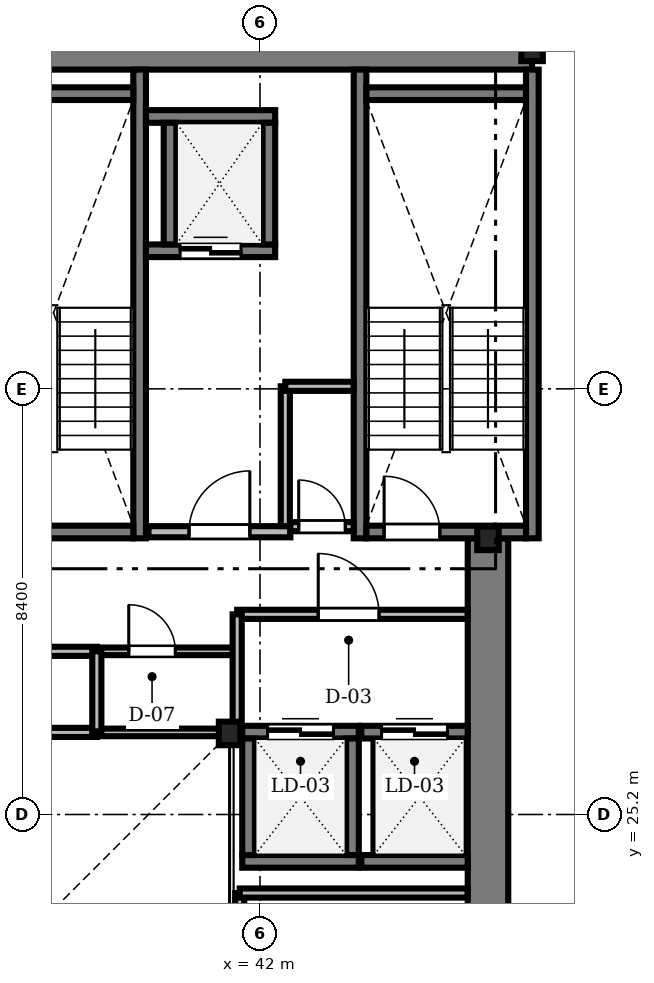
"""IFC4 building model, lengths in metres.
Left out: names, types, materials, properties, quantities, classifications, styles, units other than length and angle.
Written with IfcOpenShell. Run it as: python <this file> out.ifc"""

import sys

from ifc_helpers import new_model, si_unit, direction, frame, frame_2d, origin, origin_2d, place, context, subcontext, project, spatial, rectangle, i_section, extrude, source, transform, mapped, element, fill, save


model = new_model("IFC4")
c1 = context("Model", 3, precision=1e-05, world=origin(), true_north=direction((0.0, 1.0)))
c2 = subcontext(c1, "Body", "Model", "MODEL_VIEW")
j1 = project(units=[si_unit("LENGTHUNIT", "METRE"), si_unit("PLANEANGLEUNIT", "RADIAN")], contexts=[c1])
p1 = place(None, origin())
s1 = spatial("IfcSite", under=j1, at=p1, CompositionType="ELEMENT")
p2 = place(p1, origin())
s2 = spatial("IfcBuilding", under=s1, at=p2, CompositionType="ELEMENT")
p3 = place(p2, frame((0.0, 0.0, 107.5)))
s3 = spatial("IfcBuildingStorey", under=s2, at=p3, CompositionType="ELEMENT", Elevation=107.5)
m1 = source(origin(), c2, "Body", "SweptSolid", [
    extrude(rectangle(XDim=17.52, YDim=0.8, at=frame_2d((8.76, 0.0))), origin(), (0.0, 0.0, 1.0), 3.56),
])
p4 = place(p3, frame((29.85, 40.3, 0.0), z_axis=(0.0, 0.0, 1.0), x_axis=(1.0, 0.0, 0.0)))
e1 = element("IfcWall", 1, at=p4, inside=s3, PredefinedType="SHEAR", context=c2, shape_type="MappedRepresentation", body=[
    mapped(m1, transform((0.0, 0.0, 0.0), scale=1.0)),
])
m2 = source(origin(), c2, "Body", "SweptSolid", [
    extrude(rectangle(XDim=13.15, YDim=0.8, at=frame_2d((6.575, 0.0))), origin(), (0.0, 0.0, 1.0), 3.56),
])
p5 = place(p3, frame((46.5, 17.5, 0.0), z_axis=(0.0, 0.0, 1.0), x_axis=(0.0, 1.0, 0.0)))
e2 = element("IfcWall", 2, at=p5, inside=s3, PredefinedType="SHEAR", context=c2, shape_type="MappedRepresentation", body=[
    mapped(m2, transform((0.0, 0.0, 0.0), scale=1.0)),
])
m3 = source(origin(), c2, "Body", "SweptSolid", [
    extrude(i_section(OverallWidth=0.424, OverallDepth=0.465, WebThickness=0.035, FlangeThickness=0.056, FilletRadius=0.015, at=origin_2d()), origin(), (0.0, 0.0, 1.0), 3.56),
])
for number, where, z_axis, x_axis in (
    (3, (41.4, 26.8, 0.0), (0.0, 0.0, 1.0), (1.0, 0.0, 0.0)),
    (4, (46.5, 30.65, 0.0), (0.0, 0.0, 1.0), (1.0, 0.0, 0.0)),
    (5, (47.37, 40.3, 0.0), (0.0, 0.0, 1.0), (1.0, 0.0, 0.0)),
):
    element("IfcColumn", number, at=place(p3, frame(where, z_axis=z_axis, x_axis=x_axis)), inside=s3, PredefinedType="COLUMN", context=c2, shape_type="MappedRepresentation", body=[
        mapped(m3, transform((0.0, 0.0, 0.0), scale=1.0)),
    ])
m4 = source(origin(), c2, "Body", "SweptSolid", [
    extrude(rectangle(XDim=9.25, YDim=0.25, at=frame_2d((4.625, 0.0))), origin(), (0.0, 0.0, 1.0), 3.6),
])
p6 = place(p3, frame((39.625, 30.65, 0.0), z_axis=(0.0, 0.0, 1.0), x_axis=(0.0, 1.0, 0.0)))
e6 = element("IfcWall", 6, at=p6, inside=s3, PredefinedType="SOLIDWALL", context=c2, shape_type="MappedRepresentation", body=[
    mapped(m4, transform((0.0, 0.0, 0.0), scale=1.0)),
])
m5 = source(origin(), c2, "Body", "SweptSolid", [
    extrude(rectangle(XDim=3.15, YDim=0.25, at=frame_2d((1.575, 0.0))), origin(), (0.0, 0.0, 1.0), 3.6),
])
p7 = place(p3, frame((36.35, 39.425, 0.0), z_axis=(0.0, 0.0, 1.0), x_axis=(1.0, 0.0, 0.0)))
e7 = element("IfcWall", 7, at=p7, inside=s3, PredefinedType="SOLIDWALL", context=c2, shape_type="MappedRepresentation", body=[
    mapped(m5, transform((0.0, 0.0, 0.0), scale=1.0)),
])
p8 = place(p3, frame((36.35, 30.775, 0.0), z_axis=(0.0, 0.0, 1.0), x_axis=(1.0, 0.0, 0.0)))
e8 = element("IfcWall", 8, at=p8, inside=s3, PredefinedType="SOLIDWALL", context=c2, shape_type="MappedRepresentation", body=[
    mapped(m5, transform((0.0, 0.0, 0.0), scale=1.0)),
])
m6 = source(origin(), c2, "Body", "SweptSolid", [
    extrude(rectangle(XDim=1.1, YDim=2.2, at=frame_2d((0.55, 1.1))), frame((0.0, 0.135, 0.0), z_axis=(0.0, -1.0, 0.0), x_axis=(1.0, 0.0, 0.0)), (0.0, 0.0, 1.0), 0.27),
])
p9 = place(p8, frame((0.35, 0.0, 0.0)))
e9 = element("IfcOpeningElement", 9, at=p9, cuts=e8, PredefinedType="OPENING", context=c2, shape_type="MappedRepresentation", body=[
    mapped(m6, transform((0.0, 0.0, 0.0), scale=1.0)),
])
for number, where, z_axis, x_axis in (
    (10, (43.975, 30.65, 0.0), (0.0, 0.0, 1.0), (0.0, 1.0, 0.0)),
    (11, (47.375, 30.65, 0.0), (0.0, 0.0, 1.0), (0.0, 1.0, 0.0)),
):
    element("IfcWall", number, at=place(p3, frame(where, z_axis=z_axis, x_axis=x_axis)), inside=s3, PredefinedType="SOLIDWALL", context=c2, shape_type="MappedRepresentation", body=[
        mapped(m4, transform((0.0, 0.0, 0.0), scale=1.0)),
    ])
p10 = place(p3, frame((44.1, 39.425, 0.0), z_axis=(0.0, 0.0, 1.0), x_axis=(1.0, 0.0, 0.0)))
e12 = element("IfcWall", 12, at=p10, inside=s3, PredefinedType="SOLIDWALL", context=c2, shape_type="MappedRepresentation", body=[
    mapped(m5, transform((0.0, 0.0, 0.0), scale=1.0)),
])
p11 = place(p3, frame((44.1, 30.775, 0.0), z_axis=(0.0, 0.0, 1.0), x_axis=(1.0, 0.0, 0.0)))
e13 = element("IfcWall", 13, at=p11, inside=s3, PredefinedType="SOLIDWALL", context=c2, shape_type="MappedRepresentation", body=[
    mapped(m5, transform((0.0, 0.0, 0.0), scale=1.0)),
])
p12 = place(p11, frame((0.35, 0.0, 0.0)))
e14 = element("IfcOpeningElement", 14, at=p12, cuts=e13, PredefinedType="OPENING", context=c2, shape_type="MappedRepresentation", body=[
    mapped(m6, transform((0.0, 0.0, 0.0), scale=1.0)),
])
m7 = source(origin(), c2, "Body", "SweptSolid", [
    extrude(rectangle(XDim=2.8, YDim=0.22, at=frame_2d((1.4, 0.0))), origin(), (0.0, 0.0, 1.0), 3.56),
])
p13 = place(p3, frame((39.8, 30.78, 0.0), z_axis=(0.0, 0.0, 1.0), x_axis=(1.0, 0.0, 0.0)))
e15 = element("IfcWall", 15, at=p13, inside=s3, PredefinedType="SOLIDWALL", context=c2, shape_type="MappedRepresentation", body=[
    mapped(m7, transform((0.0, 0.0, 0.0), scale=1.0)),
])
m8 = source(origin(), c2, "Body", "SweptSolid", [
    extrude(rectangle(XDim=1.2, YDim=2.2, at=frame_2d((0.6, 1.1))), frame((0.0, 0.12, 0.0), z_axis=(0.0, -1.0, 0.0), x_axis=(1.0, 0.0, 0.0)), (0.0, 0.0, 1.0), 0.24),
])
p14 = place(p13, frame((0.8, 0.0, 0.0)))
e16 = element("IfcOpeningElement", 16, at=p14, cuts=e15, PredefinedType="OPENING", context=c2, shape_type="MappedRepresentation", body=[
    mapped(m8, transform((0.0, 0.0, 0.0), scale=1.0)),
])
m9 = source(origin(), c2, "Body", "SweptSolid", [
    extrude(rectangle(XDim=2.55, YDim=0.25, at=frame_2d((1.275, 0.0))), origin(), (0.0, 0.0, 1.0), 3.56),
])
p15 = place(p3, frame((39.75, 36.325, 0.0), z_axis=(0.0, 0.0, 1.0), x_axis=(1.0, 0.0, 0.0)))
e17 = element("IfcWall", 17, at=p15, inside=s3, PredefinedType="SOLIDWALL", context=c2, shape_type="MappedRepresentation", body=[
    mapped(m9, transform((0.0, 0.0, 0.0), scale=1.0)),
])
m10 = source(origin(), c2, "Body", "SweptSolid", [
    extrude(rectangle(XDim=1.2, YDim=2.25, at=frame_2d((0.6, 1.125))), frame((0.0, 0.135, 0.0), z_axis=(0.0, -1.0, 0.0), x_axis=(1.0, 0.0, 0.0)), (0.0, 0.0, 1.0), 0.27),
])
p16 = place(p15, frame((0.675, 0.0, 0.0)))
e18 = element("IfcOpeningElement", 18, at=p16, cuts=e17, PredefinedType="OPENING", context=c2, shape_type="MappedRepresentation", body=[
    mapped(m10, transform((0.0, 0.0, 0.0), scale=1.0)),
])
p17 = place(p3, frame((39.75, 38.975, 0.0), z_axis=(0.0, 0.0, 1.0), x_axis=(1.0, 0.0, 0.0)))
e19 = element("IfcWall", 19, at=p17, inside=s3, PredefinedType="SOLIDWALL", context=c2, shape_type="MappedRepresentation", body=[
    mapped(m9, transform((0.0, 0.0, 0.0), scale=1.0)),
])
m11 = source(origin(), c2, "Body", "SweptSolid", [
    extrude(rectangle(XDim=2.4, YDim=0.25, at=frame_2d((1.2, 0.0))), origin(), (0.0, 0.0, 1.0), 3.56),
])
for number, where, z_axis, x_axis in (
    (20, (40.225, 36.45, 0.0), (0.0, 0.0, 1.0), (0.0, 1.0, 0.0)),
    (21, (42.175, 36.45, 0.0), (0.0, 0.0, 1.0), (0.0, 1.0, 0.0)),
):
    element("IfcWall", number, at=place(p3, frame(where, z_axis=z_axis, x_axis=x_axis)), inside=s3, PredefinedType="SOLIDWALL", context=c2, shape_type="MappedRepresentation", body=[
        mapped(m11, transform((0.0, 0.0, 0.0), scale=1.0)),
    ])
m12 = source(origin(), c2, "Body", "SweptSolid", [
    extrude(rectangle(XDim=2.3, YDim=0.25, at=frame_2d((1.15, 0.0))), origin(), (0.0, 0.0, 1.0), 3.56),
])
p18 = place(p3, frame((41.65, 24.275, 0.0), z_axis=(0.0, 0.0, 1.0), x_axis=(1.0, 0.0, 0.0)))
e22 = element("IfcWall", 22, at=p18, inside=s3, PredefinedType="SOLIDWALL", context=c2, shape_type="MappedRepresentation", body=[
    mapped(m12, transform((0.0, 0.0, 0.0), scale=1.0)),
])
p19 = place(p3, frame((41.65, 26.825, 0.0), z_axis=(0.0, 0.0, 1.0), x_axis=(1.0, 0.0, 0.0)))
e23 = element("IfcWall", 23, at=p19, inside=s3, PredefinedType="SOLIDWALL", context=c2, shape_type="MappedRepresentation", body=[
    mapped(m12, transform((0.0, 0.0, 0.0), scale=1.0)),
])
m13 = source(origin(), c2, "Body", "SweptSolid", [
    extrude(rectangle(XDim=1.3, YDim=2.3, at=frame_2d((0.65, 1.15))), frame((0.0, 0.135, 0.0), z_axis=(0.0, -1.0, 0.0), x_axis=(1.0, 0.0, 0.0)), (0.0, 0.0, 1.0), 0.27),
])
p20 = place(p19, frame((0.5, 0.0, 0.0)))
e24 = element("IfcOpeningElement", 24, at=p20, cuts=e23, PredefinedType="OPENING", context=c2, shape_type="MappedRepresentation", body=[
    mapped(m13, transform((0.0, 0.0, 0.0), scale=1.0)),
])
for number, where, z_axis, x_axis in (
    (25, (41.775, 24.4, 0.0), (0.0, 0.0, 1.0), (0.0, 1.0, 0.0)),
    (26, (43.825, 24.4, 0.0), (0.0, 0.0, 1.0), (0.0, 1.0, 0.0)),
):
    element("IfcWall", number, at=place(p3, frame(where, z_axis=z_axis, x_axis=x_axis)), inside=s3, PredefinedType="SOLIDWALL", context=c2, shape_type="MappedRepresentation", body=[
        mapped(m12, transform((0.0, 0.0, 0.0), scale=1.0)),
    ])
m14 = source(origin(), c2, "Body", "SweptSolid", [
    extrude(rectangle(XDim=2.1, YDim=0.25, at=frame_2d((1.05, 0.0))), origin(), (0.0, 0.0, 1.0), 3.56),
])
p21 = place(p3, frame((44.0, 24.275, 0.0), z_axis=(0.0, 0.0, 1.0), x_axis=(1.0, 0.0, 0.0)))
e27 = element("IfcWall", 27, at=p21, inside=s3, PredefinedType="SOLIDWALL", context=c2, shape_type="MappedRepresentation", body=[
    mapped(m14, transform((0.0, 0.0, 0.0), scale=1.0)),
])
p22 = place(p3, frame((44.0, 26.825, 0.0), z_axis=(0.0, 0.0, 1.0), x_axis=(1.0, 0.0, 0.0)))
e28 = element("IfcWall", 28, at=p22, inside=s3, PredefinedType="SOLIDWALL", context=c2, shape_type="MappedRepresentation", body=[
    mapped(m14, transform((0.0, 0.0, 0.0), scale=1.0)),
])
p23 = place(p22, frame((0.4, 0.0, 0.0)))
e29 = element("IfcOpeningElement", 29, at=p23, cuts=e28, PredefinedType="OPENING", context=c2, shape_type="MappedRepresentation", body=[
    mapped(m13, transform((0.0, 0.0, 0.0), scale=1.0)),
])
m15 = source(origin(), c2, "Body", "SweptSolid", [
    extrude(rectangle(XDim=7.33, YDim=0.18, at=frame_2d((3.665, 0.0))), origin(), (0.0, 0.0, 1.0), 3.192),
])
p24 = place(p3, frame((31.45, 28.42, 0.0), z_axis=(0.0, 0.0, 1.0), x_axis=(1.0, 0.0, 0.0)))
e30 = element("IfcWall", 30, at=p24, inside=s3, PredefinedType="PARTITIONING", context=c2, shape_type="MappedRepresentation", body=[
    mapped(m15, transform((0.0, 0.0, 0.0), scale=1.0)),
])
m16 = source(origin(), c2, "Body", "SweptSolid", [
    extrude(rectangle(XDim=0.95, YDim=2.15, at=frame_2d((0.475, 1.075))), frame((0.0, 0.1, 0.0), z_axis=(0.0, -1.0, 0.0), x_axis=(1.0, 0.0, 0.0)), (0.0, 0.0, 1.0), 0.2),
])
p25 = place(p24, frame((0.65, 0.0, 0.0)))
e31 = element("IfcOpeningElement", 31, at=p25, cuts=e30, PredefinedType="OPENING", context=c2, shape_type="MappedRepresentation", body=[
    mapped(m16, transform((0.0, 0.0, 0.0), scale=1.0)),
])
m17 = source(origin(), c2, "Body", "SweptSolid", [
    extrude(rectangle(XDim=4.548, YDim=0.18, at=frame_2d((2.274, 0.0))), origin(), (0.0, 0.0, 1.0), 3.192),
])
p26 = place(p3, frame((41.55, 29.15, 0.0), z_axis=(0.0, 0.0, 1.0), x_axis=(1.0, 0.0, 0.0)))
e32 = element("IfcWall", 32, at=p26, inside=s3, PredefinedType="PARTITIONING", context=c2, shape_type="MappedRepresentation", body=[
    mapped(m17, transform((0.0, 0.0, 0.0), scale=1.0)),
])
m18 = source(origin(), c2, "Body", "SweptSolid", [
    extrude(rectangle(XDim=1.2, YDim=2.2, at=frame_2d((0.6, 1.1))), frame((0.0, 0.1, 0.0), z_axis=(0.0, -1.0, 0.0), x_axis=(1.0, 0.0, 0.0)), (0.0, 0.0, 1.0), 0.2),
])
p27 = place(p26, frame((1.6, 0.0, 0.0)))
e33 = element("IfcOpeningElement", 33, at=p27, cuts=e32, PredefinedType="OPENING", context=c2, shape_type="MappedRepresentation", body=[
    mapped(m18, transform((0.0, 0.0, 0.0), scale=1.0)),
])
m19 = source(origin(), c2, "Body", "SweptSolid", [
    extrude(rectangle(XDim=2.74, YDim=0.15, at=frame_2d((1.37, 0.0))), origin(), (0.0, 0.0, 1.0), 3.56),
])
p28 = place(p3, frame((38.78, 28.42, 0.0), z_axis=(0.0, 0.0, 1.0), x_axis=(1.0, 0.0, 0.0)))
e34 = element("IfcWall", 34, at=p28, inside=s3, PredefinedType="PARTITIONING", context=c2, shape_type="MappedRepresentation", body=[
    mapped(m19, transform((0.0, 0.0, 0.0), scale=1.0)),
])
m20 = source(origin(), c2, "Body", "SweptSolid", [
    extrude(rectangle(XDim=0.92, YDim=2.1, at=frame_2d((0.46, 1.05))), frame((0.0, 0.085, 0.0), z_axis=(0.0, -1.0, 0.0), x_axis=(1.0, 0.0, 0.0)), (0.0, 0.0, 1.0), 0.17),
])
p29 = place(p28, frame((0.63, 0.0, 0.0)))
e35 = element("IfcOpeningElement", 35, at=p29, cuts=e34, PredefinedType="OPENING", context=c2, shape_type="MappedRepresentation", body=[
    mapped(m20, transform((0.0, 0.0, 0.0), scale=1.0)),
])
m21 = source(origin(), c2, "Body", "SweptSolid", [
    extrude(rectangle(XDim=1.248, YDim=0.18, at=frame_2d((0.624, 0.0))), origin(), (0.0, 0.0, 1.0), 3.56),
])
p30 = place(p3, frame((42.6, 30.88, 0.0), z_axis=(0.0, 0.0, 1.0), x_axis=(1.0, 0.0, 0.0)))
e36 = element("IfcWall", 36, at=p30, inside=s3, PredefinedType="PARTITIONING", context=c2, shape_type="MappedRepresentation", body=[
    mapped(m21, transform((0.0, 0.0, 0.0), scale=1.0)),
])
m22 = source(origin(), c2, "Body", "SweptSolid", [
    extrude(rectangle(XDim=0.92, YDim=2.1, at=frame_2d((0.46, 1.05))), frame((0.0, 0.1, 0.0), z_axis=(0.0, -1.0, 0.0), x_axis=(1.0, 0.0, 0.0)), (0.0, 0.0, 1.0), 0.2),
])
p31 = place(p30, frame((0.164, 0.0, 0.0)))
e37 = element("IfcOpeningElement", 37, at=p31, cuts=e36, PredefinedType="OPENING", context=c2, shape_type="MappedRepresentation", body=[
    mapped(m22, transform((0.0, 0.0, 0.0), scale=1.0)),
])
m23 = source(origin(), c2, "Body", "SweptSolid", [
    extrude(rectangle(XDim=7.33, YDim=0.18, at=frame_2d((3.665, 0.0))), origin(), (0.0, 0.0, 1.0), 3.102),
])
p32 = place(p3, frame((31.45, 26.82, 0.0), z_axis=(0.0, 0.0, 1.0), x_axis=(1.0, 0.0, 0.0)))
e38 = element("IfcWall", 38, at=p32, inside=s3, PredefinedType="PARTITIONING", context=c2, shape_type="MappedRepresentation", body=[
    mapped(m23, transform((0.0, 0.0, 0.0), scale=1.0)),
])
m24 = source(origin(), c2, "Body", "SweptSolid", [
    extrude(rectangle(XDim=7.15, YDim=0.18, at=frame_2d((3.575, 0.0))), origin(), (0.0, 0.0, 1.0), 2.952),
])
p33 = place(p3, frame((41.6, 16.5, 0.0), z_axis=(0.0, 0.0, 1.0), x_axis=(0.0, 1.0, 0.0)))
e39 = element("IfcWall", 39, at=p33, inside=s3, PredefinedType="PARTITIONING", context=c2, shape_type="MappedRepresentation", body=[
    mapped(m24, transform((0.0, 0.0, 0.0), scale=1.0)),
])
m25 = source(origin(), c2, "Body", "SweptSolid", [
    extrude(rectangle(XDim=4.498, YDim=0.18, at=frame_2d((2.249, 0.0))), origin(), (0.0, 0.0, 1.0), 3.56),
])
p34 = place(p3, frame((41.6, 23.65, 0.0), z_axis=(0.0, 0.0, 1.0), x_axis=(1.0, 0.0, 0.0)))
e40 = element("IfcWall", 40, at=p34, inside=s3, PredefinedType="PARTITIONING", context=c2, shape_type="MappedRepresentation", body=[
    mapped(m25, transform((0.0, 0.0, 0.0), scale=1.0)),
])
m26 = source(origin(), c2, "Body", "SweptSolid", [
    extrude(rectangle(XDim=2.758, YDim=0.18, at=frame_2d((1.379, 0.0))), origin(), (0.0, 0.0, 1.0), 3.56),
])
p35 = place(p3, frame((42.5, 30.892, 0.0), z_axis=(0.0, 0.0, 1.0), x_axis=(0.0, 1.0, 0.0)))
e41 = element("IfcWall", 41, at=p35, inside=s3, PredefinedType="PARTITIONING", context=c2, shape_type="MappedRepresentation", body=[
    mapped(m26, transform((0.0, 0.0, 0.0), scale=1.0)),
])
m27 = source(origin(), c2, "Body", "SweptSolid", [
    extrude(rectangle(XDim=2.74, YDim=0.15, at=frame_2d((1.37, 0.0))), origin(), (0.0, 0.0, 1.0), 2.952),
])
p36 = place(p3, frame((38.78, 26.82, 0.0), z_axis=(0.0, 0.0, 1.0), x_axis=(1.0, 0.0, 0.0)))
e42 = element("IfcWall", 42, at=p36, inside=s3, PredefinedType="PARTITIONING", context=c2, shape_type="MappedRepresentation", body=[
    mapped(m27, transform((0.0, 0.0, 0.0), scale=1.0)),
])
m28 = source(origin(), c2, "Body", "SweptSolid", [
    extrude(rectangle(XDim=2.35, YDim=0.18, at=frame_2d((1.175, 0.0))), origin(), (0.0, 0.0, 1.0), 2.952),
])
p37 = place(p3, frame((41.55, 26.8, 0.0), z_axis=(0.0, 0.0, 1.0), x_axis=(0.0, 1.0, 0.0)))
e43 = element("IfcWall", 43, at=p37, inside=s3, PredefinedType="PARTITIONING", context=c2, shape_type="MappedRepresentation", body=[
    mapped(m28, transform((0.0, 0.0, 0.0), scale=1.0)),
])
m29 = source(origin(), c2, "Body", "SweptSolid", [
    extrude(rectangle(XDim=1.6, YDim=0.18, at=frame_2d((0.8, 0.0))), origin(), (0.0, 0.0, 1.0), 3.102),
])
p38 = place(p3, frame((38.78, 26.82, 0.0), z_axis=(0.0, 0.0, 1.0), x_axis=(0.0, 1.0, 0.0)))
e44 = element("IfcWall", 44, at=p38, inside=s3, PredefinedType="PARTITIONING", context=c2, shape_type="MappedRepresentation", body=[
    mapped(m29, transform((0.0, 0.0, 0.0), scale=1.0)),
])
m30 = source(origin(), c2, "Body", "SweptSolid", [
    extrude(rectangle(XDim=1.348, YDim=0.18, at=frame_2d((0.674, 0.0))), origin(), (0.0, 0.0, 1.0), 3.56),
])
p39 = place(p3, frame((42.5, 33.65, 0.0), z_axis=(0.0, 0.0, 1.0), x_axis=(1.0, 0.0, 0.0)))
e45 = element("IfcWall", 45, at=p39, inside=s3, PredefinedType="PARTITIONING", context=c2, shape_type="MappedRepresentation", body=[
    mapped(m30, transform((0.0, 0.0, 0.0), scale=1.0)),
])
m31 = source(origin(), c2, "Body", "SweptSolid", [
    extrude(rectangle(XDim=1.1, YDim=2.2, at=frame_2d((0.55, 1.1))), frame((0.0, 0.025, 0.0), z_axis=(0.0, -1.0, 0.0), x_axis=(1.0, 0.0, 0.0)), (0.0, 0.0, 1.0), 0.05),
])
p40 = place(p12, origin())
e46 = element("IfcDoor", 46, at=p40, inside=s3, OperationType="SINGLE_SWING_LEFT", PredefinedType="DOOR", context=c2, shape_type="MappedRepresentation", body=[
    mapped(m31, transform((0.0, 0.0, 0.0), scale=1.0)),
])
fill(e14, e46)
m32 = source(origin(), c2, "Body", "SweptSolid", [
    extrude(rectangle(XDim=1.2, YDim=2.2, at=frame_2d((0.6, 1.1))), frame((0.0, 0.025, 0.0), z_axis=(0.0, -1.0, 0.0), x_axis=(1.0, 0.0, 0.0)), (0.0, 0.0, 1.0), 0.05),
])
p41 = place(p14, origin())
e47 = element("IfcDoor", 47, at=p41, inside=s3, OperationType="SINGLE_SWING_RIGHT", PredefinedType="DOOR", context=c2, shape_type="MappedRepresentation", body=[
    mapped(m32, transform((0.0, 0.0, 0.0), scale=1.0)),
])
fill(e16, e47)
m33 = source(origin(), c2, "Body", "SweptSolid", [
    extrude(rectangle(XDim=1.2, YDim=2.25, at=frame_2d((0.6, 1.125))), frame((0.0, 0.025, 0.0), z_axis=(0.0, -1.0, 0.0), x_axis=(1.0, 0.0, 0.0)), (0.0, 0.0, 1.0), 0.05),
])
p42 = place(p16, origin())
e48 = element("IfcDoor", 48, at=p42, inside=s3, OperationType="DOUBLE_DOOR_SLIDING", PredefinedType="DOOR", context=c2, shape_type="MappedRepresentation", body=[
    mapped(m33, transform((0.0, 0.0, 0.0), scale=1.0)),
])
fill(e18, e48)
m34 = source(origin(), c2, "Body", "SweptSolid", [
    extrude(rectangle(XDim=1.3, YDim=2.3, at=frame_2d((0.65, 1.15))), frame((0.0, 0.025, 0.0), z_axis=(0.0, -1.0, 0.0), x_axis=(1.0, 0.0, 0.0)), (0.0, 0.0, 1.0), 0.05),
])
p43 = place(p20, origin())
e49 = element("IfcDoor", 49, at=p43, inside=s3, OperationType="DOUBLE_DOOR_SLIDING", PredefinedType="DOOR", context=c2, shape_type="MappedRepresentation", body=[
    mapped(m34, transform((0.0, 0.0, 0.0), scale=1.0)),
])
fill(e24, e49)
p44 = place(p23, origin())
e50 = element("IfcDoor", 50, at=p44, inside=s3, OperationType="DOUBLE_DOOR_SLIDING", PredefinedType="DOOR", context=c2, shape_type="MappedRepresentation", body=[
    mapped(m34, transform((0.0, 0.0, 0.0), scale=1.0)),
])
fill(e29, e50)
p45 = place(p27, origin())
e51 = element("IfcDoor", 51, at=p45, inside=s3, OperationType="SINGLE_SWING_LEFT", PredefinedType="DOOR", context=c2, shape_type="MappedRepresentation", body=[
    mapped(m32, transform((0.0, 0.0, 0.0), scale=1.0)),
])
fill(e33, e51)
m35 = source(origin(), c2, "Body", "SweptSolid", [
    extrude(rectangle(XDim=0.92, YDim=2.1, at=frame_2d((0.46, 1.05))), frame((0.0, 0.025, 0.0), z_axis=(0.0, -1.0, 0.0), x_axis=(1.0, 0.0, 0.0)), (0.0, 0.0, 1.0), 0.05),
])
p46 = place(p29, origin())
e52 = element("IfcDoor", 52, at=p46, inside=s3, OperationType="SINGLE_SWING_LEFT", PredefinedType="DOOR", context=c2, shape_type="MappedRepresentation", body=[
    mapped(m35, transform((0.0, 0.0, 0.0), scale=1.0)),
])
fill(e35, e52)
p47 = place(p31, origin())
e53 = element("IfcDoor", 53, at=p47, inside=s3, OperationType="SINGLE_SWING_LEFT", PredefinedType="DOOR", context=c2, shape_type="MappedRepresentation", body=[
    mapped(m35, transform((0.0, 0.0, 0.0), scale=1.0)),
])
fill(e37, e53)
save(model, sys.argv[1])
